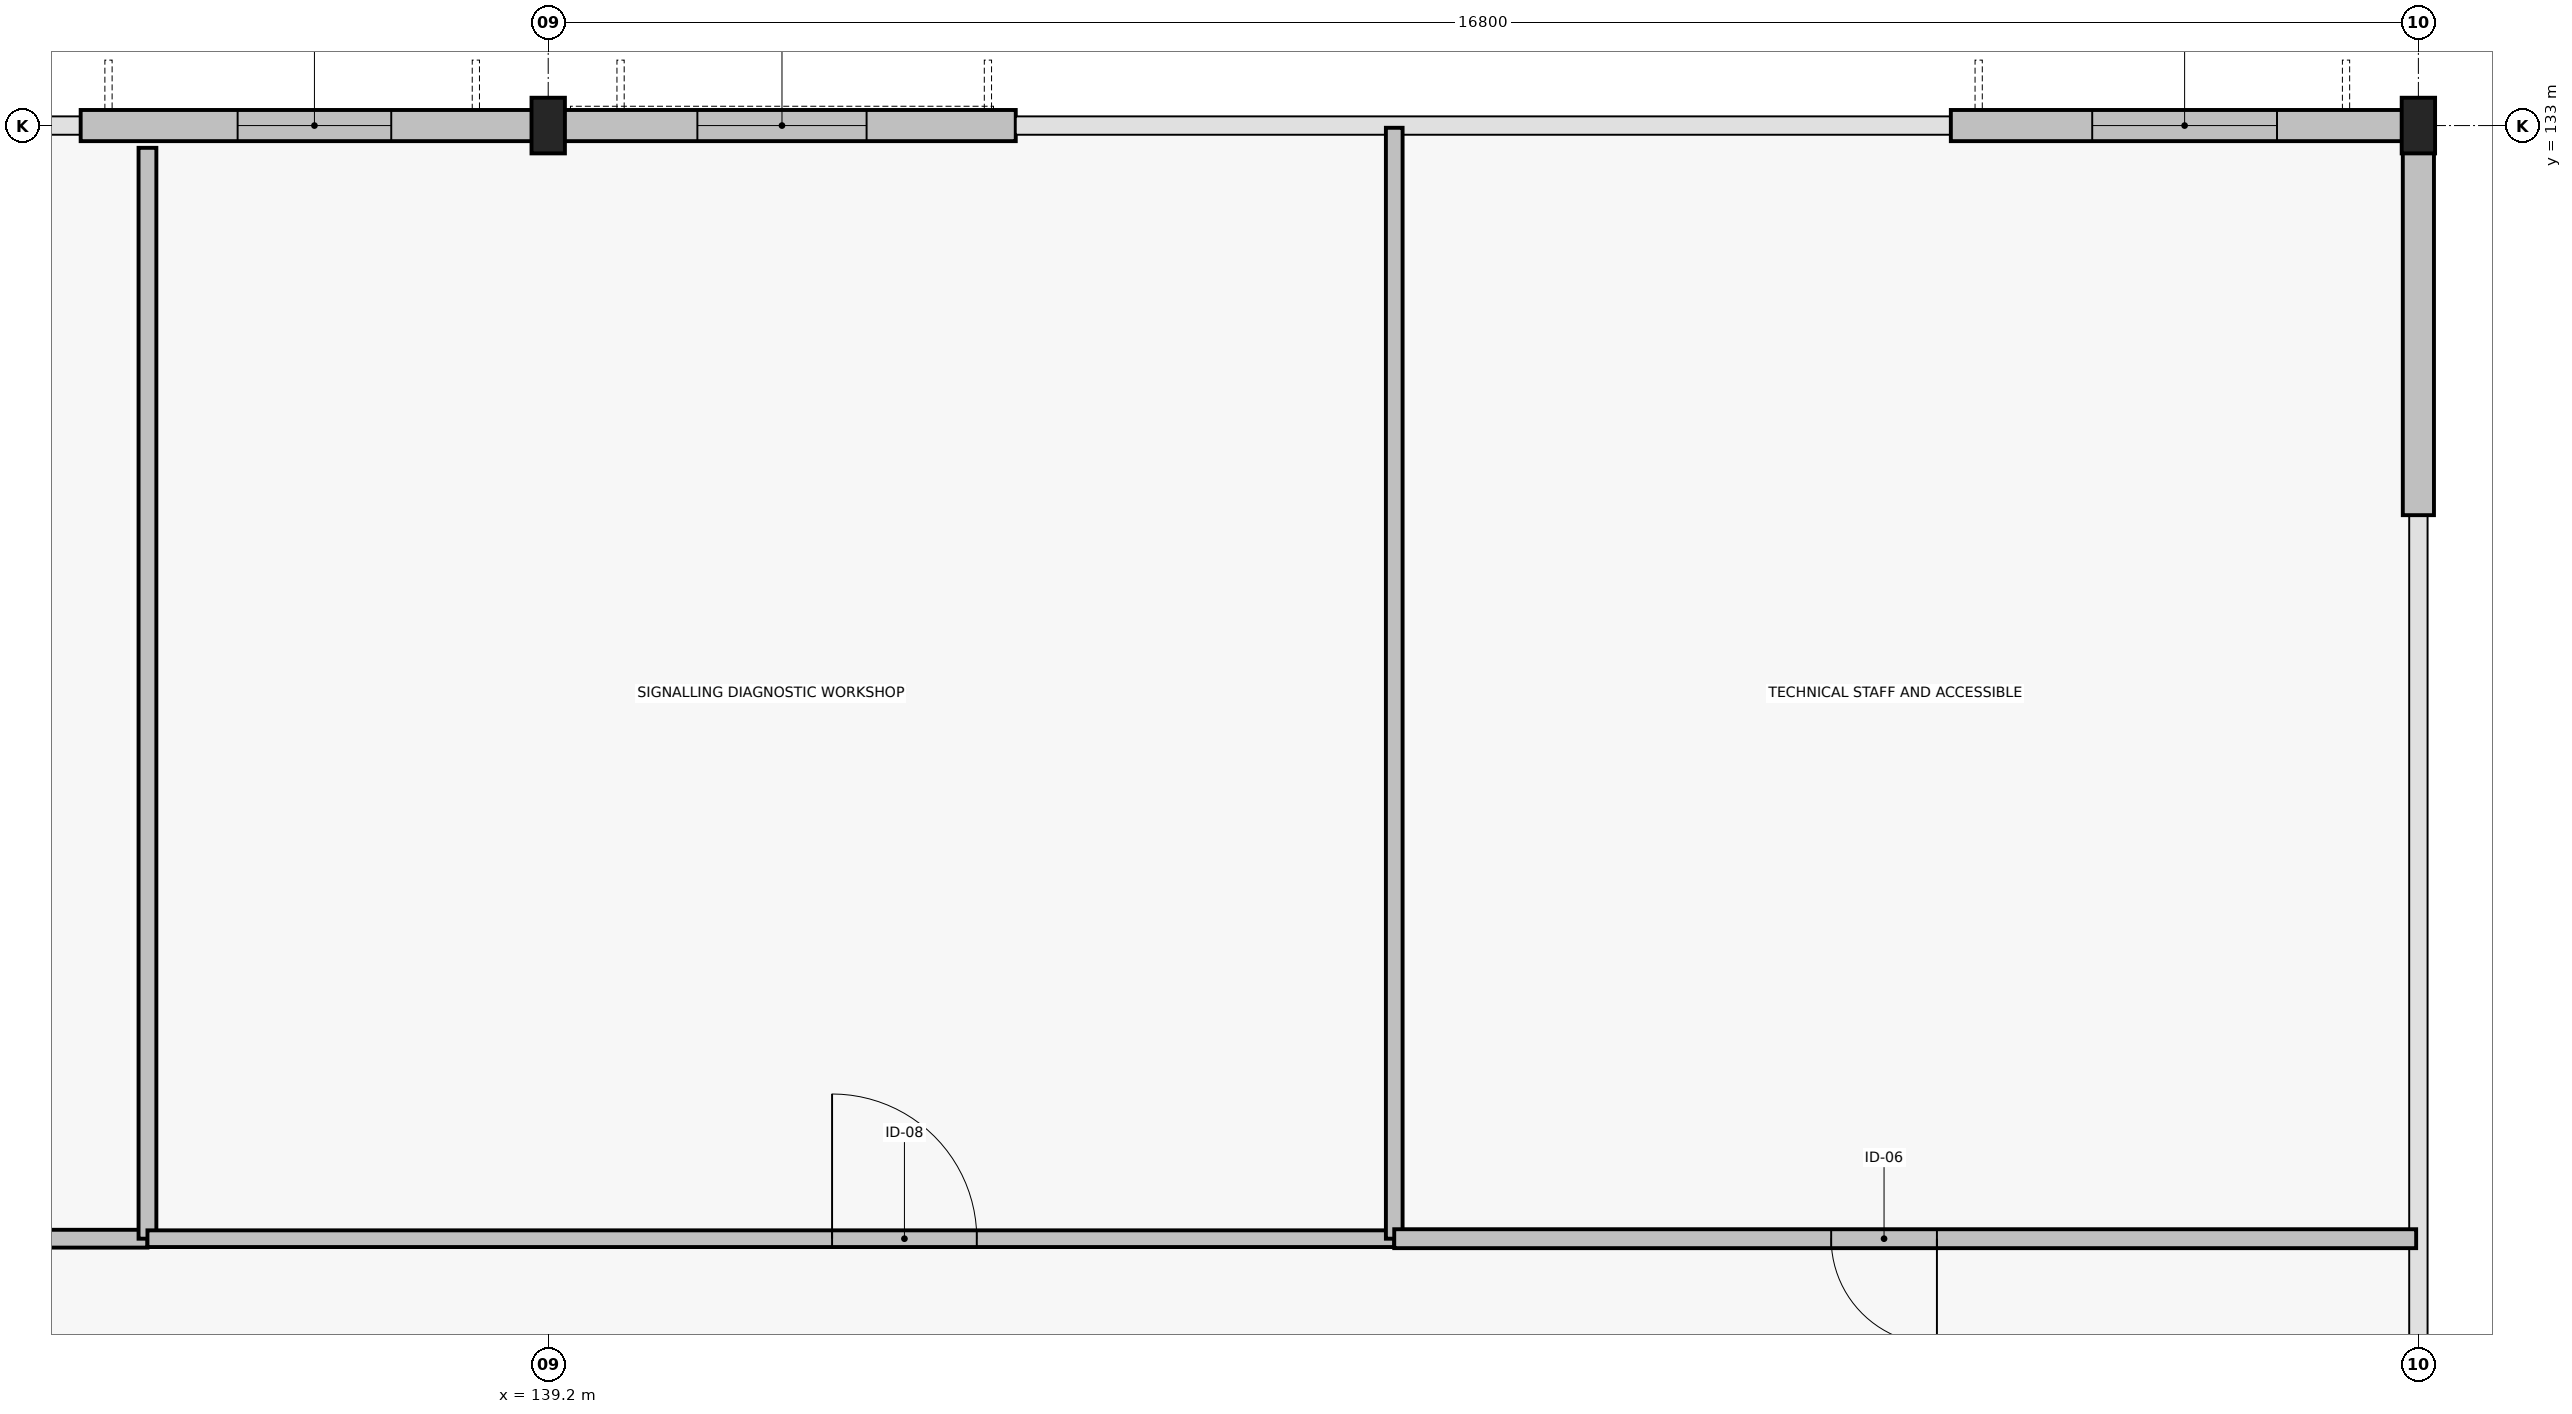
"""IFC4 building model, lengths in metres.
Left out: names, types, materials, properties, quantities, classifications, styles, units other than length and angle.
Written with IfcOpenShell. Run it as: python <this file> out.ifc"""

import sys

from ifc_helpers import new_model, si_unit, direction, frame, frame_2d, origin, origin_2d, place, context, subcontext, project, spatial, rectangle, i_section, extrude, element, fill, save


model = new_model("IFC4")
c1 = context("Model", 3, precision=1e-05, world=origin(), true_north=direction((0.0, 1.0)))
c2 = subcontext(c1, "Body", "Model", "MODEL_VIEW")
j1 = project(units=[si_unit("LENGTHUNIT", "METRE"), si_unit("PLANEANGLEUNIT", "RADIAN")], contexts=[c1])
p1 = place(None, origin())
s1 = spatial("IfcSite", under=j1, at=p1, CompositionType="ELEMENT")
p2 = place(p1, origin())
s2 = spatial("IfcBuilding", under=s1, at=p2, CompositionType="ELEMENT")
p3 = place(p2, frame((0.0, 0.0, 10.8)))
s3 = spatial("IfcBuildingStorey", under=s2, at=p3, CompositionType="ELEMENT", Elevation=10.8)
for number, where, z_axis, x_axis in (
    (1, (139.2, 133.0, 0.0), (0.0, 0.0, 1.0), (1.0, 0.0, 0.0)),
    (2, (156.0, 133.0, 0.0), (0.0, 0.0, 1.0), (1.0, 0.0, 0.0)),
):
    element("IfcColumn", number, at=place(p3, frame(where, z_axis=z_axis, x_axis=x_axis)), inside=s3, PredefinedType="COLUMN", context=c2, shape_type="SweptSolid", body=[
        extrude(i_section(OverallWidth=0.3, OverallDepth=0.5, WebThickness=0.014, FlangeThickness=0.028, FilletRadius=0.027, at=origin_2d()), origin(), (0.0, 0.0, 1.0), 6.0),
    ])
p4 = place(p3, frame((135.0, 133.0, 0.0), z_axis=(0.0, 0.0, 1.0), x_axis=(1.0, 0.0, 0.0)))
e3 = element("IfcWall", 3, at=p4, inside=s3, PredefinedType="STANDARD", context=c2, shape_type="SweptSolid", body=[
    extrude(rectangle(XDim=4.2, YDim=0.28, at=frame_2d((2.1, 0.0))), origin(), (0.0, 0.0, 1.0), 5.405),
])
p5 = place(p4, frame((1.41, 0.0, 0.8)))
e4 = element("IfcOpeningElement", 4, at=p5, cuts=e3, PredefinedType="OPENING", context=c2, shape_type="SweptSolid", body=[
    extrude(rectangle(XDim=1.38, YDim=1.37, at=frame_2d((0.69, 0.685))), frame((0.0, 0.15, 0.0), z_axis=(0.0, -1.0, 0.0), x_axis=(1.0, 0.0, 0.0)), (0.0, 0.0, 1.0), 0.3),
])
p6 = place(p3, frame((139.2, 133.0, 0.0), z_axis=(0.0, 0.0, 1.0), x_axis=(1.0, 0.0, 0.0)))
e5 = element("IfcWall", 5, at=p6, inside=s3, PredefinedType="STANDARD", context=c2, shape_type="SweptSolid", body=[
    extrude(rectangle(XDim=4.2, YDim=0.28, at=frame_2d((2.1, 0.0))), origin(), (0.0, 0.0, 1.0), 5.405),
])
p7 = place(p6, frame((1.34, 0.0, 0.8)))
e6 = element("IfcOpeningElement", 6, at=p7, cuts=e5, PredefinedType="OPENING", context=c2, shape_type="SweptSolid", body=[
    extrude(rectangle(XDim=1.52, YDim=1.25, at=frame_2d((0.76, 0.625))), frame((0.0, 0.15, 0.0), z_axis=(0.0, -1.0, 0.0), x_axis=(1.0, 0.0, 0.0)), (0.0, 0.0, 1.0), 0.3),
])
p8 = place(p3, frame((151.8, 133.0, 0.0), z_axis=(0.0, 0.0, 1.0), x_axis=(1.0, 0.0, 0.0)))
e7 = element("IfcWall", 7, at=p8, inside=s3, PredefinedType="STANDARD", context=c2, shape_type="SweptSolid", body=[
    extrude(rectangle(XDim=4.2, YDim=0.28, at=frame_2d((2.1, 0.0))), origin(), (0.0, 0.0, 1.0), 5.405),
])
p9 = place(p8, frame((1.27, 0.0, 0.8)))
e8 = element("IfcOpeningElement", 8, at=p9, cuts=e7, PredefinedType="OPENING", context=c2, shape_type="SweptSolid", body=[
    extrude(rectangle(XDim=1.66, YDim=1.31, at=frame_2d((0.83, 0.655))), frame((0.0, 0.15, 0.0), z_axis=(0.0, -1.0, 0.0), x_axis=(1.0, 0.0, 0.0)), (0.0, 0.0, 1.0), 0.3),
])
p10 = place(p3, frame((156.0, 129.5, 0.0), z_axis=(0.0, 0.0, 1.0), x_axis=(0.0, 1.0, 0.0)))
e9 = element("IfcWall", 9, at=p10, inside=s3, PredefinedType="STANDARD", context=c2, shape_type="SweptSolid", body=[
    extrude(rectangle(XDim=3.36, YDim=0.28, at=frame_2d((1.68, 0.0))), origin(), (0.0, 0.0, 1.0), 5.405),
])
p11 = place(p3, frame((118.8, 123.0, 0.0), z_axis=(0.0, 0.0, 1.0), x_axis=(1.0, 0.0, 0.0)))
e10 = element("IfcWall", 10, at=p11, inside=s3, PredefinedType="PARTITIONING", context=c2, shape_type="SweptSolid", body=[
    extrude(rectangle(XDim=16.8, YDim=0.16, at=frame_2d((8.4, 0.0))), origin(), (0.0, 0.0, 1.0), 5.8),
])
p12 = place(p11, frame((9.325, 0.0, 0.0), z_axis=(0.0, 0.0, 1.0), x_axis=(-1.0, 0.0, 0.0)))
e11 = element("IfcOpeningElement", 11, at=p12, cuts=e10, PredefinedType="OPENING", context=c2, shape_type="SweptSolid", body=[
    extrude(rectangle(XDim=1.45, YDim=2.25, at=frame_2d((0.725, 1.125))), frame((0.0, 0.09, 0.0), z_axis=(0.0, -1.0, 0.0), x_axis=(1.0, 0.0, 0.0)), (0.0, 0.0, 1.0), 0.18),
])
p13 = place(p3, frame((135.6, 123.0, 0.0), z_axis=(0.0, 0.0, 1.0), x_axis=(0.0, 1.0, 0.0)))
e12 = element("IfcWall", 12, at=p13, inside=s3, PredefinedType="PARTITIONING", context=c2, shape_type="SweptSolid", body=[
    extrude(rectangle(XDim=9.8, YDim=0.16, at=frame_2d((4.9, 0.0))), origin(), (0.0, 0.0, 1.0), 5.8),
])
p14 = place(p3, frame((135.6, 123.0, 0.0), z_axis=(0.0, 0.0, 1.0), x_axis=(1.0, 0.0, 0.0)))
e13 = element("IfcWall", 13, at=p14, inside=s3, PredefinedType="PARTITIONING", context=c2, shape_type="SweptSolid", body=[
    extrude(rectangle(XDim=11.2, YDim=0.15, at=frame_2d((5.6, 0.0))), origin(), (0.0, 0.0, 1.0), 5.8),
])
p15 = place(p14, frame((6.15, 0.0, 0.0)))
e14 = element("IfcOpeningElement", 14, at=p15, cuts=e13, PredefinedType="OPENING", context=c2, shape_type="SweptSolid", body=[
    extrude(rectangle(XDim=1.3, YDim=2.15, at=frame_2d((0.65, 1.075))), frame((0.0, 0.085, 0.0), z_axis=(0.0, -1.0, 0.0), x_axis=(1.0, 0.0, 0.0)), (0.0, 0.0, 1.0), 0.17),
])
p16 = place(p3, frame((146.8, 123.0, 0.0), z_axis=(0.0, 0.0, 1.0), x_axis=(0.0, 1.0, 0.0)))
e15 = element("IfcWall", 15, at=p16, inside=s3, PredefinedType="PARTITIONING", context=c2, shape_type="SweptSolid", body=[
    extrude(rectangle(XDim=9.98, YDim=0.15, at=frame_2d((4.99, 0.0))), origin(), (0.0, 0.0, 1.0), 5.8),
])
p17 = place(p3, frame((146.8, 123.0, 0.0), z_axis=(0.0, 0.0, 1.0), x_axis=(1.0, 0.0, 0.0)))
e16 = element("IfcWall", 16, at=p17, inside=s3, PredefinedType="PLUMBINGWALL", context=c2, shape_type="SweptSolid", body=[
    extrude(rectangle(XDim=9.18, YDim=0.17, at=frame_2d((4.59, 0.0))), origin(), (0.0, 0.0, 1.0), 5.8),
])
p18 = place(p17, frame((3.925, 0.0, 0.0)))
e17 = element("IfcOpeningElement", 17, at=p18, cuts=e16, PredefinedType="OPENING", context=c2, shape_type="SweptSolid", body=[
    extrude(rectangle(XDim=0.95, YDim=2.15, at=frame_2d((0.475, 1.075))), frame((0.0, 0.095, 0.0), z_axis=(0.0, -1.0, 0.0), x_axis=(1.0, 0.0, 0.0)), (0.0, 0.0, 1.0), 0.19),
])
p19 = place(p5, origin())
e18 = element("IfcWindow", 18, at=p19, inside=s3, PartitioningType="SINGLE_PANEL", PredefinedType="WINDOW", context=c2, shape_type="SweptSolid", body=[
    extrude(rectangle(XDim=1.38, YDim=1.37, at=frame_2d((0.69, 0.685))), frame((0.0, 0.03, 0.0), z_axis=(0.0, -1.0, 0.0), x_axis=(1.0, 0.0, 0.0)), (0.0, 0.0, 1.0), 0.06),
])
fill(e4, e18)
p20 = place(p7, origin())
e19 = element("IfcWindow", 19, at=p20, inside=s3, PartitioningType="SINGLE_PANEL", PredefinedType="WINDOW", context=c2, shape_type="SweptSolid", body=[
    extrude(rectangle(XDim=1.52, YDim=1.25, at=frame_2d((0.76, 0.625))), frame((0.0, 0.03, 0.0), z_axis=(0.0, -1.0, 0.0), x_axis=(1.0, 0.0, 0.0)), (0.0, 0.0, 1.0), 0.06),
])
fill(e6, e19)
p21 = place(p9, origin())
e20 = element("IfcWindow", 20, at=p21, inside=s3, PartitioningType="SINGLE_PANEL", PredefinedType="WINDOW", context=c2, shape_type="SweptSolid", body=[
    extrude(rectangle(XDim=1.66, YDim=1.31, at=frame_2d((0.83, 0.655))), frame((0.0, 0.03, 0.0), z_axis=(0.0, -1.0, 0.0), x_axis=(1.0, 0.0, 0.0)), (0.0, 0.0, 1.0), 0.06),
])
fill(e8, e20)
p22 = place(p15, origin())
e21 = element("IfcDoor", 21, at=p22, inside=s3, OperationType="SINGLE_SWING_LEFT", PredefinedType="DOOR", context=c2, shape_type="SweptSolid", body=[
    extrude(rectangle(XDim=1.3, YDim=2.15, at=frame_2d((0.65, 1.075))), frame((0.0, 0.025, 0.0), z_axis=(0.0, -1.0, 0.0), x_axis=(1.0, 0.0, 0.0)), (0.0, 0.0, 1.0), 0.05),
])
fill(e14, e21)
p23 = place(p18, origin())
e22 = element("IfcDoor", 22, at=p23, inside=s3, OperationType="SINGLE_SWING_RIGHT", PredefinedType="DOOR", context=c2, shape_type="SweptSolid", body=[
    extrude(rectangle(XDim=0.95, YDim=2.15, at=frame_2d((0.475, 1.075))), frame((0.0, 0.025, 0.0), z_axis=(0.0, -1.0, 0.0), x_axis=(1.0, 0.0, 0.0)), (0.0, 0.0, 1.0), 0.05),
])
fill(e17, e22)
save(model, sys.argv[1])
